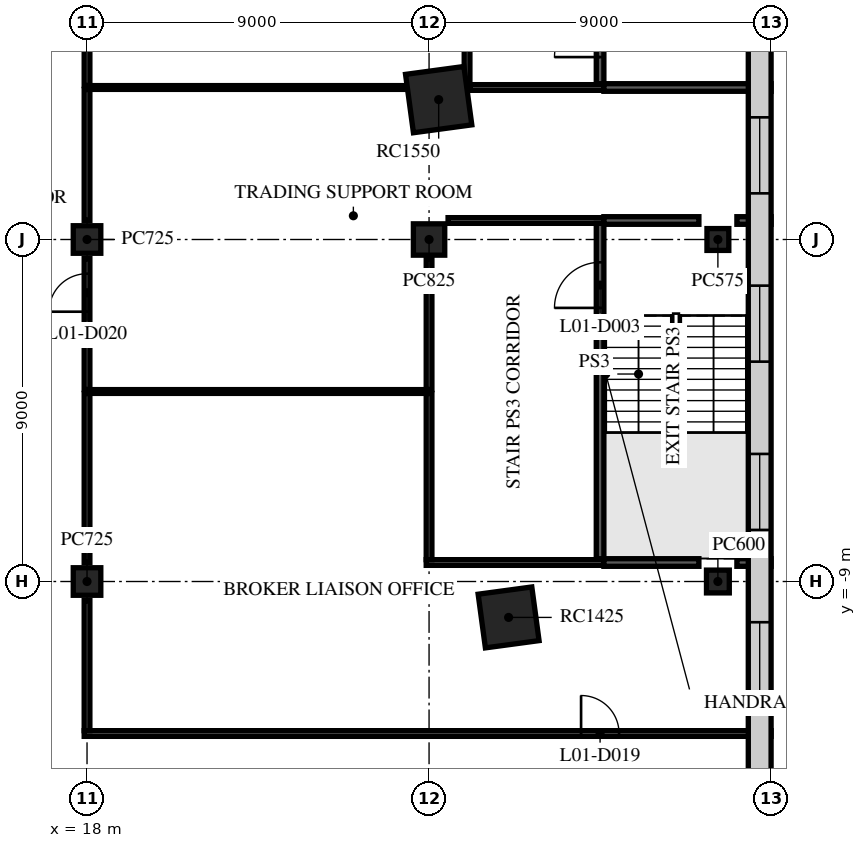
"""IFC4 building model, lengths in metres.
Left out: names, types, materials, properties, quantities, classifications, styles, units other than length and angle.
Written with IfcOpenShell. Run it as: python <this file> out.ifc"""

import sys

from ifc_helpers import new_model, si_unit, direction, frame, frame_2d, origin, origin_2d, place, context, subcontext, project, spatial, rectangle, extrude, element, fill, save


model = new_model("IFC4")
c1 = context("Model", 3, precision=1e-05, world=origin(), true_north=direction((0.0, 1.0)))
c2 = subcontext(c1, "Body", "Model", "MODEL_VIEW")
j1 = project(units=[si_unit("LENGTHUNIT", "METRE"), si_unit("PLANEANGLEUNIT", "RADIAN")], contexts=[c1])
p1 = place(None, origin())
s1 = spatial("IfcSite", under=j1, at=p1, CompositionType="ELEMENT")
p2 = place(p1, origin())
s2 = spatial("IfcBuilding", under=s1, at=p2, CompositionType="ELEMENT")
p3 = place(p2, frame((0.0, 0.0, 4.5)))
s3 = spatial("IfcBuildingStorey", under=s2, at=p3, CompositionType="ELEMENT", Elevation=4.5)
for number, where, z_axis, x_axis in (
    (1, (18.0, -9.0, 0.0), (0.0, 0.0, 1.0), (1.0, 0.0, 0.0)),
    (2, (18.0, 0.0, 0.0), (0.0, 0.0, 1.0), (1.0, 0.0, 0.0)),
):
    element("IfcColumn", number, at=place(p3, frame(where, z_axis=z_axis, x_axis=x_axis)), inside=s3, PredefinedType="COLUMN", context=c2, shape_type="SweptSolid", body=[
        extrude(rectangle(XDim=0.725, YDim=0.725, at=origin_2d()), origin(), (0.0, 0.0, 1.0), 4.5),
    ])
p4 = place(p3, frame((27.0, 0.0, 0.0), z_axis=(0.0, 0.0, 1.0), x_axis=(1.0, 0.0, 0.0)))
e3 = element("IfcColumn", 3, at=p4, inside=s3, PredefinedType="COLUMN", context=c2, shape_type="SweptSolid", body=[
    extrude(rectangle(XDim=0.825, YDim=0.825, at=origin_2d()), origin(), (0.0, 0.0, 1.0), 4.5),
])
p5 = place(p3, frame((34.6, -9.0, 0.0), z_axis=(0.0, 0.0, 1.0), x_axis=(1.0, 0.0, 0.0)))
e4 = element("IfcColumn", 4, at=p5, inside=s3, PredefinedType="COLUMN", context=c2, shape_type="SweptSolid", body=[
    extrude(rectangle(XDim=0.6, YDim=0.6, at=origin_2d()), origin(), (0.0, 0.0, 1.0), 4.5),
])
p6 = place(p3, frame((34.6, 0.0, 0.0), z_axis=(0.0, 0.0, 1.0), x_axis=(1.0, 0.0, 0.0)))
e5 = element("IfcColumn", 5, at=p6, inside=s3, PredefinedType="COLUMN", context=c2, shape_type="SweptSolid", body=[
    extrude(rectangle(XDim=0.575, YDim=0.575, at=origin_2d()), origin(), (0.0, 0.0, 1.0), 4.5),
])
p7 = place(p3, frame((29.093, -9.945, 0.0), z_axis=(0.0, 0.0, 1.0), x_axis=(0.991001197216, 0.133853005627, 0.0)))
e6 = element("IfcColumn", 6, at=p7, inside=s3, PredefinedType="COLUMN", context=c2, shape_type="SweptSolid", body=[
    extrude(rectangle(XDim=1.425, YDim=1.425, at=origin_2d()), origin(), (0.0, 0.0, 1.0), 4.5),
])
p8 = place(p3, frame((27.253, 3.681, 0.0), z_axis=(0.0, 0.0, 1.0), x_axis=(0.991001197216, 0.133853005627, 0.0)))
e7 = element("IfcColumn", 7, at=p8, inside=s3, PredefinedType="COLUMN", context=c2, shape_type="SweptSolid", body=[
    extrude(rectangle(XDim=1.55, YDim=1.55, at=origin_2d()), origin(), (0.0, 0.0, 1.0), 4.5),
])
p9 = place(p3, frame((17.925, -13.0, 0.0), z_axis=(0.0, 0.0, 1.0), x_axis=(1.0, 0.0, 0.0)))
e8 = element("IfcWall", 8, at=p9, inside=s3, PredefinedType="PARTITIONING", context=c2, shape_type="SweptSolid", body=[
    extrude(rectangle(XDim=18.075, YDim=0.15, at=frame_2d((9.038, 0.0))), origin(), (0.0, 0.0, 1.0), 4.1),
])
p10 = place(p9, frame((13.075, 0.0, 0.0)))
e9 = element("IfcOpeningElement", 9, at=p10, cuts=e8, PredefinedType="OPENING", context=c2, shape_type="SweptSolid", body=[
    extrude(rectangle(XDim=1.0, YDim=2.1, at=frame_2d((0.5, 1.05))), frame((0.0, 0.085, 0.0), z_axis=(0.0, -1.0, 0.0), x_axis=(1.0, 0.0, 0.0)), (0.0, 0.0, 1.0), 0.17),
])
p11 = place(p3, frame((26.925, -8.5, 0.0), z_axis=(0.0, 0.0, 1.0), x_axis=(1.0, 0.0, 0.0)))
e10 = element("IfcWall", 10, at=p11, inside=s3, PredefinedType="PARTITIONING", context=c2, shape_type="SweptSolid", body=[
    extrude(rectangle(XDim=4.675, YDim=0.15, at=frame_2d((2.337, 0.0))), origin(), (0.0, 0.0, 1.0), 4.1),
])
p12 = place(p3, frame((31.6, -8.5, 0.0), z_axis=(0.0, 0.0, 1.0), x_axis=(1.0, 0.0, 0.0)))
e11 = element("IfcWall", 11, at=p12, inside=s3, PredefinedType="PARTITIONING", context=c2, shape_type="SweptSolid", body=[
    extrude(rectangle(XDim=2.5, YDim=0.2, at=frame_2d((1.25, 0.0))), origin(), (0.0, 0.0, 1.0), 4.1),
])
p13 = place(p3, frame((35.1, -8.5, 0.0), z_axis=(0.0, 0.0, 1.0), x_axis=(1.0, 0.0, 0.0)))
e12 = element("IfcWall", 12, at=p13, inside=s3, PredefinedType="PARTITIONING", context=c2, shape_type="SweptSolid", body=[
    extrude(rectangle(XDim=0.9, YDim=0.2, at=frame_2d((0.45, 0.0))), origin(), (0.0, 0.0, 1.0), 4.1),
])
p14 = place(p3, frame((18.075, -4.0, 0.0), z_axis=(0.0, 0.0, 1.0), x_axis=(1.0, 0.0, 0.0)))
e13 = element("IfcWall", 13, at=p14, inside=s3, PredefinedType="PARTITIONING", context=c2, shape_type="SweptSolid", body=[
    extrude(rectangle(XDim=8.85, YDim=0.1, at=frame_2d((4.425, 0.0))), origin(), (0.0, 0.0, 1.0), 4.1),
])
p15 = place(p3, frame((27.5, 0.5, 0.0), z_axis=(0.0, 0.0, 1.0), x_axis=(1.0, 0.0, 0.0)))
e14 = element("IfcWall", 14, at=p15, inside=s3, PredefinedType="PARTITIONING", context=c2, shape_type="SweptSolid", body=[
    extrude(rectangle(XDim=4.1, YDim=0.15, at=frame_2d((2.05, 0.0))), origin(), (0.0, 0.0, 1.0), 4.1),
])
p16 = place(p3, frame((31.6, 0.5, 0.0), z_axis=(0.0, 0.0, 1.0), x_axis=(1.0, 0.0, 0.0)))
e15 = element("IfcWall", 15, at=p16, inside=s3, PredefinedType="PARTITIONING", context=c2, shape_type="SweptSolid", body=[
    extrude(rectangle(XDim=2.5, YDim=0.2, at=frame_2d((1.25, 0.0))), origin(), (0.0, 0.0, 1.0), 4.1),
])
p17 = place(p3, frame((35.1, 0.5, 0.0), z_axis=(0.0, 0.0, 1.0), x_axis=(1.0, 0.0, 0.0)))
e16 = element("IfcWall", 16, at=p17, inside=s3, PredefinedType="PARTITIONING", context=c2, shape_type="SweptSolid", body=[
    extrude(rectangle(XDim=0.9, YDim=0.2, at=frame_2d((0.45, 0.0))), origin(), (0.0, 0.0, 1.0), 4.1),
])
p18 = place(p3, frame((18.075, 4.0, 0.0), z_axis=(0.0, 0.0, 1.0), x_axis=(1.0, 0.0, 0.0)))
e17 = element("IfcWall", 17, at=p18, inside=s3, PredefinedType="PARTITIONING", context=c2, shape_type="SweptSolid", body=[
    extrude(rectangle(XDim=8.447, YDim=0.1, at=frame_2d((4.223, 0.0))), origin(), (0.0, 0.0, 1.0), 4.1),
])
p19 = place(p3, frame((28.075, 4.0, 0.0), z_axis=(0.0, 0.0, 1.0), x_axis=(1.0, 0.0, 0.0)))
e18 = element("IfcWall", 18, at=p19, inside=s3, PredefinedType="PARTITIONING", context=c2, shape_type="SweptSolid", body=[
    extrude(rectangle(XDim=3.525, YDim=0.15, at=frame_2d((1.763, 0.0))), origin(), (0.0, 0.0, 1.0), 4.1),
])
p20 = place(p3, frame((31.6, 4.0, 0.0), z_axis=(0.0, 0.0, 1.0), x_axis=(1.0, 0.0, 0.0)))
e19 = element("IfcWall", 19, at=p20, inside=s3, PredefinedType="PARTITIONING", context=c2, shape_type="SweptSolid", body=[
    extrude(rectangle(XDim=4.4, YDim=0.2, at=frame_2d((2.2, 0.0))), origin(), (0.0, 0.0, 1.0), 4.1),
])
p21 = place(p3, frame((18.0, -12.925, 0.0), z_axis=(0.0, 0.0, 1.0), x_axis=(0.0, 1.0, 0.0)))
e20 = element("IfcWall", 20, at=p21, inside=s3, PredefinedType="PARTITIONING", context=c2, shape_type="SweptSolid", body=[
    extrude(rectangle(XDim=3.425, YDim=0.15, at=frame_2d((1.712, 0.0))), origin(), (0.0, 0.0, 1.0), 4.1),
])
p22 = place(p3, frame((18.0, -8.5, 0.0), z_axis=(0.0, 0.0, 1.0), x_axis=(0.0, 1.0, 0.0)))
e21 = element("IfcWall", 21, at=p22, inside=s3, PredefinedType="PARTITIONING", context=c2, shape_type="SweptSolid", body=[
    extrude(rectangle(XDim=4.45, YDim=0.15, at=frame_2d((2.225, 0.0))), origin(), (0.0, 0.0, 1.0), 4.1),
])
p23 = place(p3, frame((18.0, -3.95, 0.0), z_axis=(0.0, 0.0, 1.0), x_axis=(0.0, 1.0, 0.0)))
e22 = element("IfcWall", 22, at=p23, inside=s3, PredefinedType="PARTITIONING", context=c2, shape_type="SweptSolid", body=[
    extrude(rectangle(XDim=3.45, YDim=0.15, at=frame_2d((1.725, 0.0))), origin(), (0.0, 0.0, 1.0), 4.1),
])
p24 = place(p23, frame((2.05, 0.0, 0.0)))
e23 = element("IfcOpeningElement", 23, at=p24, cuts=e22, PredefinedType="OPENING", context=c2, shape_type="SweptSolid", body=[
    extrude(rectangle(XDim=1.0, YDim=2.1, at=frame_2d((0.5, 1.05))), frame((0.0, 0.085, 0.0), z_axis=(0.0, -1.0, 0.0), x_axis=(1.0, 0.0, 0.0)), (0.0, 0.0, 1.0), 0.17),
])
p25 = place(p3, frame((18.0, 0.5, 0.0), z_axis=(0.0, 0.0, 1.0), x_axis=(0.0, 1.0, 0.0)))
e24 = element("IfcWall", 24, at=p25, inside=s3, PredefinedType="PARTITIONING", context=c2, shape_type="SweptSolid", body=[
    extrude(rectangle(XDim=3.45, YDim=0.15, at=frame_2d((1.725, 0.0))), origin(), (0.0, 0.0, 1.0), 4.1),
])
p26 = place(p3, frame((18.0, 4.05, 0.0), z_axis=(0.0, 0.0, 1.0), x_axis=(0.0, 1.0, 0.0)))
e25 = element("IfcWall", 25, at=p26, inside=s3, PredefinedType="PARTITIONING", context=c2, shape_type="SweptSolid", body=[
    extrude(rectangle(XDim=4.45, YDim=0.15, at=frame_2d((2.225, 0.0))), origin(), (0.0, 0.0, 1.0), 4.1),
])
p27 = place(p3, frame((27.0, -8.425, 0.0), z_axis=(0.0, 0.0, 1.0), x_axis=(0.0, 1.0, 0.0)))
e26 = element("IfcWall", 26, at=p27, inside=s3, PredefinedType="PARTITIONING", context=c2, shape_type="SweptSolid", body=[
    extrude(rectangle(XDim=4.375, YDim=0.15, at=frame_2d((2.188, 0.0))), origin(), (0.0, 0.0, 1.0), 4.1),
])
p28 = place(p3, frame((27.0, -3.95, 0.0), z_axis=(0.0, 0.0, 1.0), x_axis=(0.0, 1.0, 0.0)))
e27 = element("IfcWall", 27, at=p28, inside=s3, PredefinedType="PARTITIONING", context=c2, shape_type="SweptSolid", body=[
    extrude(rectangle(XDim=3.45, YDim=0.15, at=frame_2d((1.725, 0.0))), origin(), (0.0, 0.0, 1.0), 4.1),
])
p29 = place(p3, frame((28.0, 4.075, 0.0), z_axis=(0.0, 0.0, 1.0), x_axis=(0.0, 1.0, 0.0)))
e28 = element("IfcWall", 28, at=p29, inside=s3, PredefinedType="PARTITIONING", context=c2, shape_type="SweptSolid", body=[
    extrude(rectangle(XDim=8.85, YDim=0.15, at=frame_2d((4.425, 0.0))), origin(), (0.0, 0.0, 1.0), 4.1),
])
p30 = place(p3, frame((31.5, -8.4, 0.0), z_axis=(0.0, 0.0, 1.0), x_axis=(0.0, 1.0, 0.0)))
e29 = element("IfcWall", 29, at=p30, inside=s3, PredefinedType="PARTITIONING", context=c2, shape_type="SweptSolid", body=[
    extrude(rectangle(XDim=8.825, YDim=0.2, at=frame_2d((4.413, 0.0))), origin(), (0.0, 0.0, 1.0), 4.1),
])
p31 = place(p30, frame((6.6, 0.0, 0.0)))
e30 = element("IfcOpeningElement", 30, at=p31, cuts=e29, PredefinedType="OPENING", context=c2, shape_type="SweptSolid", body=[
    extrude(rectangle(XDim=1.2, YDim=2.1, at=frame_2d((0.6, 1.05))), frame((0.0, 0.11, 0.0), z_axis=(0.0, -1.0, 0.0), x_axis=(1.0, 0.0, 0.0)), (0.0, 0.0, 1.0), 0.22),
])
p32 = place(p3, frame((31.5, 4.1, 0.0), z_axis=(0.0, 0.0, 1.0), x_axis=(0.0, 1.0, 0.0)))
e31 = element("IfcWall", 31, at=p32, inside=s3, PredefinedType="PARTITIONING", context=c2, shape_type="SweptSolid", body=[
    extrude(rectangle(XDim=8.8, YDim=0.2, at=frame_2d((4.4, 0.0))), origin(), (0.0, 0.0, 1.0), 4.1),
])
p33 = place(p32, frame((0.7, 0.0, 0.0)))
e32 = element("IfcOpeningElement", 32, at=p33, cuts=e31, PredefinedType="OPENING", context=c2, shape_type="SweptSolid", body=[
    extrude(rectangle(XDim=1.2, YDim=2.1, at=frame_2d((0.6, 1.05))), frame((0.0, 0.11, 0.0), z_axis=(0.0, -1.0, 0.0), x_axis=(1.0, 0.0, 0.0)), (0.0, 0.0, 1.0), 0.22),
])
p34 = place(p3, frame((35.7, -30.876, 0.0), z_axis=(0.0, 0.0, 1.0), x_axis=(0.0, 1.0, 0.0)))
e33 = element("IfcWall", 33, at=p34, inside=s3, PredefinedType="STANDARD", context=c2, shape_type="SweptSolid", body=[
    extrude(rectangle(XDim=61.751, YDim=0.6, at=frame_2d((30.876, 0.0))), origin(), (0.0, 0.0, 1.0), 4.1),
])
p35 = place(p34, frame((1.152, 0.0, 0.9)))
e34 = element("IfcOpeningElement", 34, at=p35, cuts=e33, PredefinedType="OPENING", context=c2, shape_type="SweptSolid", body=[
    extrude(rectangle(XDim=2.0, YDim=3.0, at=frame_2d((1.0, 1.5))), frame((0.0, 0.31, 0.0), z_axis=(0.0, -1.0, 0.0), x_axis=(1.0, 0.0, 0.0)), (0.0, 0.0, 1.0), 0.62),
])
p36 = place(p34, frame((5.519, 0.0, 0.9)))
e35 = element("IfcOpeningElement", 35, at=p36, cuts=e33, PredefinedType="OPENING", context=c2, shape_type="SweptSolid", body=[
    extrude(rectangle(XDim=2.0, YDim=3.0, at=frame_2d((1.0, 1.5))), frame((0.0, 0.31, 0.0), z_axis=(0.0, -1.0, 0.0), x_axis=(1.0, 0.0, 0.0)), (0.0, 0.0, 1.0), 0.62),
])
p37 = place(p34, frame((9.947, 0.0, 0.9)))
e36 = element("IfcOpeningElement", 36, at=p37, cuts=e33, PredefinedType="OPENING", context=c2, shape_type="SweptSolid", body=[
    extrude(rectangle(XDim=2.0, YDim=3.0, at=frame_2d((1.0, 1.5))), frame((0.0, 0.31, 0.0), z_axis=(0.0, -1.0, 0.0), x_axis=(1.0, 0.0, 0.0)), (0.0, 0.0, 1.0), 0.62),
])
p38 = place(p34, frame((14.376, 0.0, 0.9)))
e37 = element("IfcOpeningElement", 37, at=p38, cuts=e33, PredefinedType="OPENING", context=c2, shape_type="SweptSolid", body=[
    extrude(rectangle(XDim=2.0, YDim=3.0, at=frame_2d((1.0, 1.5))), frame((0.0, 0.31, 0.0), z_axis=(0.0, -1.0, 0.0), x_axis=(1.0, 0.0, 0.0)), (0.0, 0.0, 1.0), 0.62),
])
p39 = place(p34, frame((18.804, 0.0, 0.9)))
e38 = element("IfcOpeningElement", 38, at=p39, cuts=e33, PredefinedType="OPENING", context=c2, shape_type="SweptSolid", body=[
    extrude(rectangle(XDim=2.0, YDim=3.0, at=frame_2d((1.0, 1.5))), frame((0.0, 0.31, 0.0), z_axis=(0.0, -1.0, 0.0), x_axis=(1.0, 0.0, 0.0)), (0.0, 0.0, 1.0), 0.62),
])
p40 = place(p34, frame((23.233, 0.0, 0.9)))
e39 = element("IfcOpeningElement", 39, at=p40, cuts=e33, PredefinedType="OPENING", context=c2, shape_type="SweptSolid", body=[
    extrude(rectangle(XDim=2.0, YDim=3.0, at=frame_2d((1.0, 1.5))), frame((0.0, 0.31, 0.0), z_axis=(0.0, -1.0, 0.0), x_axis=(1.0, 0.0, 0.0)), (0.0, 0.0, 1.0), 0.62),
])
p41 = place(p34, frame((27.662, 0.0, 0.9)))
e40 = element("IfcOpeningElement", 40, at=p41, cuts=e33, PredefinedType="OPENING", context=c2, shape_type="SweptSolid", body=[
    extrude(rectangle(XDim=2.0, YDim=3.0, at=frame_2d((1.0, 1.5))), frame((0.0, 0.31, 0.0), z_axis=(0.0, -1.0, 0.0), x_axis=(1.0, 0.0, 0.0)), (0.0, 0.0, 1.0), 0.62),
])
p42 = place(p34, frame((32.09, 0.0, 0.9)))
e41 = element("IfcOpeningElement", 41, at=p42, cuts=e33, PredefinedType="OPENING", context=c2, shape_type="SweptSolid", body=[
    extrude(rectangle(XDim=2.0, YDim=3.0, at=frame_2d((1.0, 1.5))), frame((0.0, 0.31, 0.0), z_axis=(0.0, -1.0, 0.0), x_axis=(1.0, 0.0, 0.0)), (0.0, 0.0, 1.0), 0.62),
])
p43 = place(p34, frame((36.519, 0.0, 0.9)))
e42 = element("IfcOpeningElement", 42, at=p43, cuts=e33, PredefinedType="OPENING", context=c2, shape_type="SweptSolid", body=[
    extrude(rectangle(XDim=2.0, YDim=3.0, at=frame_2d((1.0, 1.5))), frame((0.0, 0.31, 0.0), z_axis=(0.0, -1.0, 0.0), x_axis=(1.0, 0.0, 0.0)), (0.0, 0.0, 1.0), 0.62),
])
p44 = place(p34, frame((45.376, 0.0, 0.9)))
e43 = element("IfcOpeningElement", 43, at=p44, cuts=e33, PredefinedType="OPENING", context=c2, shape_type="SweptSolid", body=[
    extrude(rectangle(XDim=2.0, YDim=3.0, at=frame_2d((1.0, 1.5))), frame((0.0, 0.31, 0.0), z_axis=(0.0, -1.0, 0.0), x_axis=(1.0, 0.0, 0.0)), (0.0, 0.0, 1.0), 0.62),
])
p45 = place(p34, frame((49.804, 0.0, 0.9)))
e44 = element("IfcOpeningElement", 44, at=p45, cuts=e33, PredefinedType="OPENING", context=c2, shape_type="SweptSolid", body=[
    extrude(rectangle(XDim=2.0, YDim=3.0, at=frame_2d((1.0, 1.5))), frame((0.0, 0.31, 0.0), z_axis=(0.0, -1.0, 0.0), x_axis=(1.0, 0.0, 0.0)), (0.0, 0.0, 1.0), 0.62),
])
p46 = place(p34, frame((58.599, 0.0, 0.9)))
e45 = element("IfcOpeningElement", 45, at=p46, cuts=e33, PredefinedType="OPENING", context=c2, shape_type="SweptSolid", body=[
    extrude(rectangle(XDim=2.0, YDim=3.0, at=frame_2d((1.0, 1.5))), frame((0.0, 0.31, 0.0), z_axis=(0.0, -1.0, 0.0), x_axis=(1.0, 0.0, 0.0)), (0.0, 0.0, 1.0), 0.62),
])
p47 = place(p31, frame((1.2, 0.0, 0.0), z_axis=(0.0, 0.0, 1.0), x_axis=(-1.0, 0.0, 0.0)))
e46 = element("IfcDoor", 46, at=p47, inside=s3, OperationType="SINGLE_SWING_LEFT", PredefinedType="DOOR", context=c2, shape_type="SweptSolid", body=[
    extrude(rectangle(XDim=1.2, YDim=2.1, at=frame_2d((0.6, 1.05))), frame((0.0, 0.025, 0.0), z_axis=(0.0, -1.0, 0.0), x_axis=(1.0, 0.0, 0.0)), (0.0, 0.0, 1.0), 0.05),
])
fill(e30, e46)
p48 = place(p33, frame((1.2, 0.0, 0.0), z_axis=(0.0, 0.0, 1.0), x_axis=(-1.0, 0.0, 0.0)))
e47 = element("IfcDoor", 47, at=p48, inside=s3, OperationType="SINGLE_SWING_RIGHT", PredefinedType="DOOR", context=c2, shape_type="SweptSolid", body=[
    extrude(rectangle(XDim=1.2, YDim=2.1, at=frame_2d((0.6, 1.05))), frame((0.0, 0.025, 0.0), z_axis=(0.0, -1.0, 0.0), x_axis=(1.0, 0.0, 0.0)), (0.0, 0.0, 1.0), 0.05),
])
fill(e32, e47)
p49 = place(p10, origin())
e48 = element("IfcDoor", 48, at=p49, inside=s3, OperationType="SINGLE_SWING_LEFT", PredefinedType="DOOR", context=c2, shape_type="SweptSolid", body=[
    extrude(rectangle(XDim=1.0, YDim=2.1, at=frame_2d((0.5, 1.05))), frame((0.0, 0.025, 0.0), z_axis=(0.0, -1.0, 0.0), x_axis=(1.0, 0.0, 0.0)), (0.0, 0.0, 1.0), 0.05),
])
fill(e9, e48)
p50 = place(p24, origin())
e49 = element("IfcDoor", 49, at=p50, inside=s3, OperationType="SINGLE_SWING_RIGHT", PredefinedType="DOOR", context=c2, shape_type="SweptSolid", body=[
    extrude(rectangle(XDim=1.0, YDim=2.1, at=frame_2d((0.5, 1.05))), frame((0.0, 0.025, 0.0), z_axis=(0.0, -1.0, 0.0), x_axis=(1.0, 0.0, 0.0)), (0.0, 0.0, 1.0), 0.05),
])
fill(e23, e49)
p51 = place(p39, origin())
e50 = element("IfcWindow", 50, at=p51, inside=s3, PartitioningType="SINGLE_PANEL", PredefinedType="WINDOW", context=c2, shape_type="SweptSolid", body=[
    extrude(rectangle(XDim=2.0, YDim=3.0, at=frame_2d((1.0, 1.5))), frame((0.0, 0.03, 0.0), z_axis=(0.0, -1.0, 0.0), x_axis=(1.0, 0.0, 0.0)), (0.0, 0.0, 1.0), 0.06),
])
fill(e38, e50)
p52 = place(p40, origin())
e51 = element("IfcWindow", 51, at=p52, inside=s3, PartitioningType="SINGLE_PANEL", PredefinedType="WINDOW", context=c2, shape_type="SweptSolid", body=[
    extrude(rectangle(XDim=2.0, YDim=3.0, at=frame_2d((1.0, 1.5))), frame((0.0, 0.03, 0.0), z_axis=(0.0, -1.0, 0.0), x_axis=(1.0, 0.0, 0.0)), (0.0, 0.0, 1.0), 0.06),
])
fill(e39, e51)
p53 = place(p41, origin())
e52 = element("IfcWindow", 52, at=p53, inside=s3, PartitioningType="SINGLE_PANEL", PredefinedType="WINDOW", context=c2, shape_type="SweptSolid", body=[
    extrude(rectangle(XDim=2.0, YDim=3.0, at=frame_2d((1.0, 1.5))), frame((0.0, 0.03, 0.0), z_axis=(0.0, -1.0, 0.0), x_axis=(1.0, 0.0, 0.0)), (0.0, 0.0, 1.0), 0.06),
])
fill(e40, e52)
p54 = place(p42, origin())
e53 = element("IfcWindow", 53, at=p54, inside=s3, PartitioningType="SINGLE_PANEL", PredefinedType="WINDOW", context=c2, shape_type="SweptSolid", body=[
    extrude(rectangle(XDim=2.0, YDim=3.0, at=frame_2d((1.0, 1.5))), frame((0.0, 0.03, 0.0), z_axis=(0.0, -1.0, 0.0), x_axis=(1.0, 0.0, 0.0)), (0.0, 0.0, 1.0), 0.06),
])
fill(e41, e53)
save(model, sys.argv[1])
